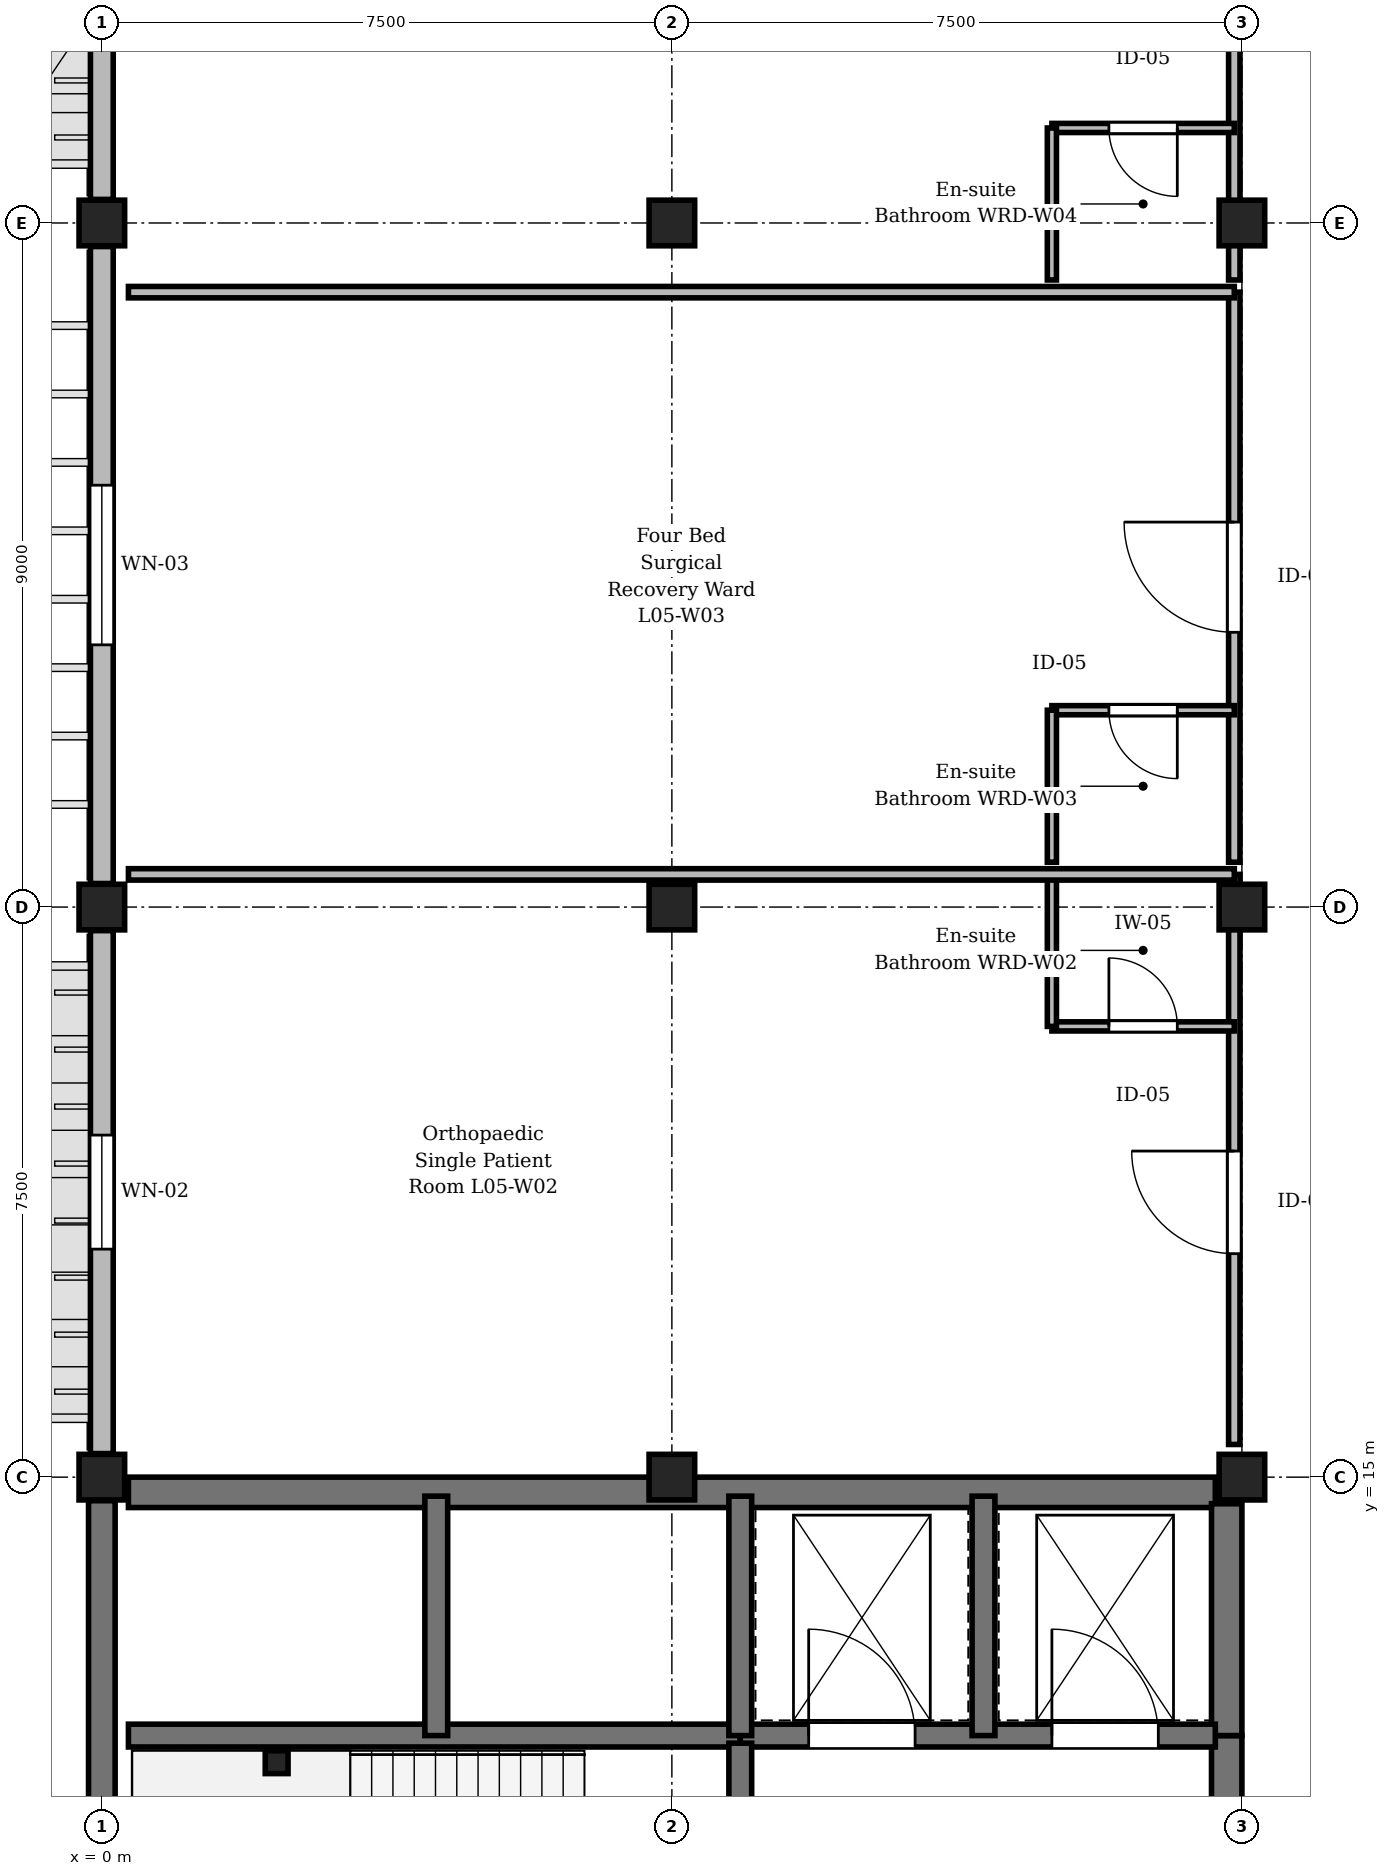
"""IFC4 building model, lengths in metres.
Left out: names, types, materials, properties, quantities, classifications, styles, units other than length and angle.
Written with IfcOpenShell. Run it as: python <this file> out.ifc"""

import sys

from ifc_helpers import new_model, si_unit, direction, frame, frame_2d, origin, origin_2d, place, context, subcontext, project, spatial, rectangle, circle, i_section, extrude, element, fill, save


model = new_model("IFC4")
c1 = context("Model", 3, precision=1e-05, world=origin(), true_north=direction((0.0, 1.0)))
c2 = subcontext(c1, "Body", "Model", "MODEL_VIEW")
j1 = project(units=[si_unit("LENGTHUNIT", "METRE"), si_unit("PLANEANGLEUNIT", "RADIAN")], contexts=[c1])
p1 = place(None, origin())
s1 = spatial("IfcSite", under=j1, at=p1, CompositionType="ELEMENT")
p2 = place(p1, origin())
s2 = spatial("IfcBuilding", under=s1, at=p2, CompositionType="ELEMENT")
p3 = place(p2, frame((0.0, 0.0, 21.9)))
s3 = spatial("IfcBuildingStorey", under=s2, at=p3, CompositionType="ELEMENT", Elevation=21.9)
p4 = place(p3, frame((0.0, 15.0, 0.0), z_axis=(0.0, 0.0, 1.0), x_axis=(1.0, 0.0, 0.0)))
e1 = element("IfcColumn", 1, at=p4, inside=s3, PredefinedType="COLUMN", context=c2, shape_type="SweptSolid", body=[
    extrude(rectangle(XDim=0.6, YDim=0.6, at=origin_2d()), origin(), (0.0, 0.0, 1.0), 4.05),
])
p5 = place(p3, frame((0.0, 22.5, 0.0), z_axis=(0.0, 0.0, 1.0), x_axis=(1.0, 0.0, 0.0)))
e2 = element("IfcColumn", 2, at=p5, inside=s3, PredefinedType="COLUMN", context=c2, shape_type="SweptSolid", body=[
    extrude(circle(Radius=0.3, at=origin_2d()), origin(), (0.0, 0.0, 1.0), 4.05),
])
p6 = place(p3, frame((0.0, 31.5, 0.0), z_axis=(0.0, 0.0, 1.0), x_axis=(1.0, 0.0, 0.0)))
e3 = element("IfcColumn", 3, at=p6, inside=s3, PredefinedType="COLUMN", context=c2, shape_type="SweptSolid", body=[
    extrude(rectangle(XDim=0.6, YDim=0.6, at=origin_2d()), origin(), (0.0, 0.0, 1.0), 4.05),
])
p7 = place(p3, frame((7.5, 15.0, 0.0), z_axis=(0.0, 0.0, 1.0), x_axis=(1.0, 0.0, 0.0)))
e4 = element("IfcColumn", 4, at=p7, inside=s3, PredefinedType="COLUMN", context=c2, shape_type="SweptSolid", body=[
    extrude(circle(Radius=0.3, at=origin_2d()), origin(), (0.0, 0.0, 1.0), 4.05),
])
for number, where, z_axis, x_axis in (
    (5, (7.5, 22.5, 0.0), (0.0, 0.0, 1.0), (1.0, 0.0, 0.0)),
    (6, (7.5, 31.5, 0.0), (0.0, 0.0, 1.0), (1.0, 0.0, 0.0)),
    (7, (15.0, 15.0, 0.0), (0.0, 0.0, 1.0), (1.0, 0.0, 0.0)),
    (8, (15.0, 22.5, 0.0), (0.0, 0.0, 1.0), (1.0, 0.0, 0.0)),
):
    element("IfcColumn", number, at=place(p3, frame(where, z_axis=z_axis, x_axis=x_axis)), inside=s3, PredefinedType="COLUMN", context=c2, shape_type="SweptSolid", body=[
        extrude(rectangle(XDim=0.6, YDim=0.6, at=origin_2d()), origin(), (0.0, 0.0, 1.0), 4.05),
    ])
p8 = place(p3, frame((15.0, 31.5, 0.0), z_axis=(0.0, 0.0, 1.0), x_axis=(1.0, 0.0, 0.0)))
e9 = element("IfcColumn", 9, at=p8, inside=s3, PredefinedType="COLUMN", context=c2, shape_type="SweptSolid", body=[
    extrude(circle(Radius=0.3, at=origin_2d()), origin(), (0.0, 0.0, 1.0), 4.05),
])
p9 = place(p3, frame((2.3, 11.25, 0.0), z_axis=(0.0, 0.0, 1.0), x_axis=(1.0, 0.0, 0.0)))
e10 = element("IfcColumn", 10, at=p9, inside=s3, PredefinedType="COLUMN", context=c2, shape_type="SweptSolid", body=[
    extrude(i_section(OverallWidth=0.3, OverallDepth=0.3, WebThickness=0.011, FlangeThickness=0.019, FilletRadius=0.027, at=origin_2d()), origin(), (0.0, 0.0, 1.0), 4.05),
])
p10 = place(p3, frame((0.0, 7.81, 0.0), z_axis=(0.0, 0.0, 1.0), x_axis=(0.0, 1.0, 0.0)))
e11 = element("IfcWall", 11, at=p10, inside=s3, PredefinedType="SHEAR", context=c2, shape_type="SweptSolid", body=[
    extrude(rectangle(XDim=6.88, YDim=0.35, at=frame_2d((3.44, 0.0))), origin(), (0.0, 0.0, 1.0), 3.77),
])
p11 = place(p3, frame((0.0, 15.31, 0.0), z_axis=(0.0, 0.0, 1.0), x_axis=(0.0, 1.0, 0.0)))
e12 = element("IfcWall", 12, at=p11, inside=s3, PredefinedType="STANDARD", context=c2, shape_type="SweptSolid", body=[
    extrude(rectangle(XDim=6.88, YDim=0.3, at=frame_2d((3.44, 0.0))), origin(), (0.0, 0.0, 1.0), 3.17),
])
p12 = place(p11, frame((2.69, 0.0, 0.9)))
e13 = element("IfcOpeningElement", 13, at=p12, cuts=e12, PredefinedType="OPENING", context=c2, shape_type="SweptSolid", body=[
    extrude(rectangle(XDim=1.5, YDim=1.99, at=frame_2d((0.75, 0.995))), frame((0.0, 0.16, 0.0), z_axis=(0.0, -1.0, 0.0), x_axis=(1.0, 0.0, 0.0)), (0.0, 0.0, 1.0), 0.32),
])
p13 = place(p3, frame((0.0, 22.81, 0.0), z_axis=(0.0, 0.0, 1.0), x_axis=(0.0, 1.0, 0.0)))
e14 = element("IfcWall", 14, at=p13, inside=s3, PredefinedType="STANDARD", context=c2, shape_type="SweptSolid", body=[
    extrude(rectangle(XDim=8.38, YDim=0.3, at=frame_2d((4.19, 0.0))), origin(), (0.0, 0.0, 1.0), 3.22),
])
p14 = place(p13, frame((3.14, 0.0, 0.9)))
e15 = element("IfcOpeningElement", 15, at=p14, cuts=e14, PredefinedType="OPENING", context=c2, shape_type="SweptSolid", body=[
    extrude(rectangle(XDim=2.1, YDim=2.04, at=frame_2d((1.05, 1.02))), frame((0.0, 0.16, 0.0), z_axis=(0.0, -1.0, 0.0), x_axis=(1.0, 0.0, 0.0)), (0.0, 0.0, 1.0), 0.32),
])
p15 = place(p3, frame((0.0, 31.81, 0.0), z_axis=(0.0, 0.0, 1.0), x_axis=(0.0, 1.0, 0.0)))
e16 = element("IfcWall", 16, at=p15, inside=s3, PredefinedType="STANDARD", context=c2, shape_type="SweptSolid", body=[
    extrude(rectangle(XDim=6.88, YDim=0.3, at=frame_2d((3.44, 0.0))), origin(), (0.0, 0.0, 1.0), 3.17),
])
p16 = place(p15, frame((2.24, 0.0, 0.9)))
e17 = element("IfcOpeningElement", 17, at=p16, cuts=e16, PredefinedType="OPENING", context=c2, shape_type="SweptSolid", body=[
    extrude(rectangle(XDim=2.4, YDim=1.99, at=frame_2d((1.2, 0.995))), frame((0.0, 0.16, 0.0), z_axis=(0.0, -1.0, 0.0), x_axis=(1.0, 0.0, 0.0)), (0.0, 0.0, 1.0), 0.32),
])
p17 = place(p3, frame((0.35, 14.8, 0.0), z_axis=(0.0, 0.0, 1.0), x_axis=(1.0, 0.0, 0.0)))
e18 = element("IfcWall", 18, at=p17, inside=s3, PredefinedType="SHEAR", context=c2, shape_type="SweptSolid", body=[
    extrude(rectangle(XDim=14.3, YDim=0.4, at=frame_2d((7.15, 0.0))), origin(), (0.0, 0.0, 1.0), 3.77),
])
p18 = place(p3, frame((14.8, 7.85, 0.0), z_axis=(0.0, 0.0, 1.0), x_axis=(0.0, 1.0, 0.0)))
e19 = element("IfcWall", 19, at=p18, inside=s3, PredefinedType="SHEAR", context=c2, shape_type="SweptSolid", body=[
    extrude(rectangle(XDim=3.75, YDim=0.4, at=frame_2d((1.875, 0.0))), origin(), (0.0, 0.0, 1.0), 3.77),
])
p19 = place(p3, frame((14.8, 11.6, 0.0), z_axis=(0.0, 0.0, 1.0), x_axis=(0.0, 1.0, 0.0)))
e20 = element("IfcWall", 20, at=p19, inside=s3, PredefinedType="SHEAR", context=c2, shape_type="SweptSolid", body=[
    extrude(rectangle(XDim=3.05, YDim=0.4, at=frame_2d((1.525, 0.0))), origin(), (0.0, 0.0, 1.0), 3.77),
])
p20 = place(p3, frame((0.35, 11.6, 0.0), z_axis=(0.0, 0.0, 1.0), x_axis=(1.0, 0.0, 0.0)))
e21 = element("IfcWall", 21, at=p20, inside=s3, PredefinedType="SHEAR", context=c2, shape_type="SweptSolid", body=[
    extrude(rectangle(XDim=8.05, YDim=0.3, at=frame_2d((4.025, 0.0))), origin(), (0.0, 0.0, 1.0), 3.77),
])
p21 = place(p3, frame((8.4, 11.6, 0.0), z_axis=(0.0, 0.0, 1.0), x_axis=(1.0, 0.0, 0.0)))
e22 = element("IfcWall", 22, at=p21, inside=s3, PredefinedType="SHEAR", context=c2, shape_type="SweptSolid", body=[
    extrude(rectangle(XDim=6.25, YDim=0.3, at=frame_2d((3.125, 0.0))), origin(), (0.0, 0.0, 1.0), 3.77),
])
p22 = place(p21, frame((0.9, 0.0, 0.0)))
e23 = element("IfcOpeningElement", 23, at=p22, cuts=e22, PredefinedType="OPENING", context=c2, shape_type="SweptSolid", body=[
    extrude(rectangle(XDim=1.4, YDim=2.25, at=frame_2d((0.7, 1.125))), frame((0.0, 0.16, 0.0), z_axis=(0.0, -1.0, 0.0), x_axis=(1.0, 0.0, 0.0)), (0.0, 0.0, 1.0), 0.32),
])
p23 = place(p21, frame((4.1, 0.0, 0.0)))
e24 = element("IfcOpeningElement", 24, at=p23, cuts=e22, PredefinedType="OPENING", context=c2, shape_type="SweptSolid", body=[
    extrude(rectangle(XDim=1.4, YDim=2.25, at=frame_2d((0.7, 1.125))), frame((0.0, 0.16, 0.0), z_axis=(0.0, -1.0, 0.0), x_axis=(1.0, 0.0, 0.0)), (0.0, 0.0, 1.0), 0.32),
])
p24 = place(p3, frame((8.4, 11.5, 0.0), z_axis=(0.0, 0.0, 1.0), x_axis=(0.0, -1.0, 0.0)))
e25 = element("IfcWall", 25, at=p24, inside=s3, PredefinedType="SHEAR", context=c2, shape_type="SweptSolid", body=[
    extrude(rectangle(XDim=3.65, YDim=0.3, at=frame_2d((1.825, 0.0))), origin(), (0.0, 0.0, 1.0), 3.77),
])
p25 = place(p24, frame((1.22, 0.0, 0.0)))
e26 = element("IfcOpeningElement", 26, at=p25, cuts=e25, PredefinedType="OPENING", context=c2, shape_type="SweptSolid", body=[
    extrude(rectangle(XDim=1.2, YDim=2.25, at=frame_2d((0.6, 1.125))), frame((0.0, 0.16, 0.0), z_axis=(0.0, -1.0, 0.0), x_axis=(1.0, 0.0, 0.0)), (0.0, 0.0, 1.0), 0.32),
])
for number, where, z_axis, x_axis in (
    (27, (4.4, 11.6, 0.0), (0.0, 0.0, 1.0), (0.0, 1.0, 0.0)),
    (28, (8.4, 11.6, 0.0), (0.0, 0.0, 1.0), (0.0, 1.0, 0.0)),
    (29, (11.6, 11.6, 0.0), (0.0, 0.0, 1.0), (0.0, 1.0, 0.0)),
):
    element("IfcWall", number, at=place(p3, frame(where, z_axis=z_axis, x_axis=x_axis)), inside=s3, PredefinedType="SHEAR", context=c2, shape_type="SweptSolid", body=[
        extrude(rectangle(XDim=3.15, YDim=0.3, at=frame_2d((1.575, 0.0))), origin(), (0.0, 0.0, 1.0), 3.77),
    ])
p26 = place(p3, frame((14.9, 15.43, 0.0), z_axis=(0.0, 0.0, 1.0), x_axis=(0.0, 1.0, 0.0)))
e30 = element("IfcWall", 30, at=p26, inside=s3, PredefinedType="PARTITIONING", context=c2, shape_type="SweptSolid", body=[
    extrude(rectangle(XDim=7.5, YDim=0.15, at=frame_2d((3.75, 0.0))), origin(), (0.0, 0.0, 1.0), 3.055),
])
p27 = place(p26, frame((2.51, 0.0, 0.0)))
e31 = element("IfcOpeningElement", 31, at=p27, cuts=e30, PredefinedType="OPENING", context=c2, shape_type="SweptSolid", body=[
    extrude(rectangle(XDim=1.35, YDim=2.25, at=frame_2d((0.675, 1.125))), frame((0.0, 0.085, 0.0), z_axis=(0.0, -1.0, 0.0), x_axis=(1.0, 0.0, 0.0)), (0.0, 0.0, 1.0), 0.17),
])
p28 = place(p3, frame((12.5, 20.93, 0.0), z_axis=(0.0, 0.0, 1.0), x_axis=(1.0, 0.0, 0.0)))
e32 = element("IfcWall", 32, at=p28, inside=s3, PredefinedType="PARTITIONING", context=c2, shape_type="SweptSolid", body=[
    extrude(rectangle(XDim=2.4, YDim=0.12, at=frame_2d((1.2, 0.0))), origin(), (0.0, 0.0, 1.0), 3.755),
])
p29 = place(p28, frame((0.75, 0.0, 0.0)))
e33 = element("IfcOpeningElement", 33, at=p29, cuts=e32, PredefinedType="OPENING", context=c2, shape_type="SweptSolid", body=[
    extrude(rectangle(XDim=0.9, YDim=2.1, at=frame_2d((0.45, 1.05))), frame((0.0, 0.07, 0.0), z_axis=(0.0, -1.0, 0.0), x_axis=(1.0, 0.0, 0.0)), (0.0, 0.0, 1.0), 0.14),
])
p30 = place(p3, frame((12.5, 20.93, 0.0), z_axis=(0.0, 0.0, 1.0), x_axis=(0.0, 1.0, 0.0)))
e34 = element("IfcWall", 34, at=p30, inside=s3, PredefinedType="PARTITIONING", context=c2, shape_type="SweptSolid", body=[
    extrude(rectangle(XDim=2.0, YDim=0.12, at=frame_2d((1.0, 0.0))), origin(), (0.0, 0.0, 1.0), 3.755),
])
p31 = place(p3, frame((14.9, 23.09, 0.0), z_axis=(0.0, 0.0, 1.0), x_axis=(0.0, 1.0, 0.0)))
e35 = element("IfcWall", 35, at=p31, inside=s3, PredefinedType="PARTITIONING", context=c2, shape_type="SweptSolid", body=[
    extrude(rectangle(XDim=7.5, YDim=0.15, at=frame_2d((3.75, 0.0))), origin(), (0.0, 0.0, 1.0), 3.055),
])
p32 = place(p31, frame((3.025, 0.0, 0.0)))
e36 = element("IfcOpeningElement", 36, at=p32, cuts=e35, PredefinedType="OPENING", context=c2, shape_type="SweptSolid", body=[
    extrude(rectangle(XDim=1.45, YDim=2.3, at=frame_2d((0.725, 1.15))), frame((0.0, 0.085, 0.0), z_axis=(0.0, -1.0, 0.0), x_axis=(1.0, 0.0, 0.0)), (0.0, 0.0, 1.0), 0.17),
])
p33 = place(p3, frame((14.9, 25.09, 0.0), z_axis=(0.0, 0.0, 1.0), x_axis=(-1.0, 0.0, 0.0)))
e37 = element("IfcWall", 37, at=p33, inside=s3, PredefinedType="PARTITIONING", context=c2, shape_type="SweptSolid", body=[
    extrude(rectangle(XDim=2.4, YDim=0.12, at=frame_2d((1.2, 0.0))), origin(), (0.0, 0.0, 1.0), 3.755),
])
p34 = place(p33, frame((0.75, 0.0, 0.0)))
e38 = element("IfcOpeningElement", 38, at=p34, cuts=e37, PredefinedType="OPENING", context=c2, shape_type="SweptSolid", body=[
    extrude(rectangle(XDim=0.9, YDim=2.1, at=frame_2d((0.45, 1.05))), frame((0.0, 0.07, 0.0), z_axis=(0.0, -1.0, 0.0), x_axis=(1.0, 0.0, 0.0)), (0.0, 0.0, 1.0), 0.14),
])
p35 = place(p3, frame((12.5, 23.09, 0.0), z_axis=(0.0, 0.0, 1.0), x_axis=(0.0, 1.0, 0.0)))
e39 = element("IfcWall", 39, at=p35, inside=s3, PredefinedType="PARTITIONING", context=c2, shape_type="SweptSolid", body=[
    extrude(rectangle(XDim=2.0, YDim=0.12, at=frame_2d((1.0, 0.0))), origin(), (0.0, 0.0, 1.0), 3.755),
])
p36 = place(p3, frame((14.9, 30.75, 0.0), z_axis=(0.0, 0.0, 1.0), x_axis=(0.0, 1.0, 0.0)))
e40 = element("IfcWall", 40, at=p36, inside=s3, PredefinedType="PARTITIONING", context=c2, shape_type="SweptSolid", body=[
    extrude(rectangle(XDim=7.5, YDim=0.15, at=frame_2d((3.75, 0.0))), origin(), (0.0, 0.0, 1.0), 3.055),
])
p37 = place(p36, frame((3.64, 0.0, 0.0)))
e41 = element("IfcOpeningElement", 41, at=p37, cuts=e40, PredefinedType="OPENING", context=c2, shape_type="SweptSolid", body=[
    extrude(rectangle(XDim=1.35, YDim=2.25, at=frame_2d((0.675, 1.125))), frame((0.0, 0.085, 0.0), z_axis=(0.0, -1.0, 0.0), x_axis=(1.0, 0.0, 0.0)), (0.0, 0.0, 1.0), 0.17),
])
p38 = place(p3, frame((14.9, 32.75, 0.0), z_axis=(0.0, 0.0, 1.0), x_axis=(-1.0, 0.0, 0.0)))
e42 = element("IfcWall", 42, at=p38, inside=s3, PredefinedType="PARTITIONING", context=c2, shape_type="SweptSolid", body=[
    extrude(rectangle(XDim=2.4, YDim=0.12, at=frame_2d((1.2, 0.0))), origin(), (0.0, 0.0, 1.0), 3.755),
])
p39 = place(p38, frame((0.75, 0.0, 0.0)))
e43 = element("IfcOpeningElement", 43, at=p39, cuts=e42, PredefinedType="OPENING", context=c2, shape_type="SweptSolid", body=[
    extrude(rectangle(XDim=0.9, YDim=2.1, at=frame_2d((0.45, 1.05))), frame((0.0, 0.07, 0.0), z_axis=(0.0, -1.0, 0.0), x_axis=(1.0, 0.0, 0.0)), (0.0, 0.0, 1.0), 0.14),
])
p40 = place(p3, frame((12.5, 30.75, 0.0), z_axis=(0.0, 0.0, 1.0), x_axis=(0.0, 1.0, 0.0)))
e44 = element("IfcWall", 44, at=p40, inside=s3, PredefinedType="PARTITIONING", context=c2, shape_type="SweptSolid", body=[
    extrude(rectangle(XDim=2.0, YDim=0.12, at=frame_2d((1.0, 0.0))), origin(), (0.0, 0.0, 1.0), 3.755),
])
for number, where, z_axis, x_axis in (
    (45, (0.35, 22.93, 0.0), (0.0, 0.0, 1.0), (1.0, 0.0, 0.0)),
    (46, (0.35, 30.59, 0.0), (0.0, 0.0, 1.0), (1.0, 0.0, 0.0)),
):
    element("IfcWall", number, at=place(p3, frame(where, z_axis=z_axis, x_axis=x_axis)), inside=s3, PredefinedType="PARTITIONING", context=c2, shape_type="SweptSolid", body=[
        extrude(rectangle(XDim=14.55, YDim=0.15, at=frame_2d((7.275, 0.0))), origin(), (0.0, 0.0, 1.0), 3.755),
    ])
p41 = place(p12, origin())
e47 = element("IfcWindow", 47, at=p41, inside=s3, PartitioningType="SINGLE_PANEL", PredefinedType="WINDOW", context=c2, shape_type="SweptSolid", body=[
    extrude(rectangle(XDim=1.5, YDim=1.99, at=frame_2d((0.75, 0.995))), frame((0.0, 0.03, 0.0), z_axis=(0.0, -1.0, 0.0), x_axis=(1.0, 0.0, 0.0)), (0.0, 0.0, 1.0), 0.06),
])
fill(e13, e47)
p42 = place(p14, origin())
e48 = element("IfcWindow", 48, at=p42, inside=s3, PartitioningType="SINGLE_PANEL", PredefinedType="WINDOW", context=c2, shape_type="SweptSolid", body=[
    extrude(rectangle(XDim=2.1, YDim=2.04, at=frame_2d((1.05, 1.02))), frame((0.0, 0.03, 0.0), z_axis=(0.0, -1.0, 0.0), x_axis=(1.0, 0.0, 0.0)), (0.0, 0.0, 1.0), 0.06),
])
fill(e15, e48)
p43 = place(p22, origin())
e49 = element("IfcDoor", 49, at=p43, inside=s3, OperationType="DOUBLE_DOOR_SLIDING", PredefinedType="DOOR", context=c2, shape_type="SweptSolid", body=[
    extrude(rectangle(XDim=1.4, YDim=2.25, at=frame_2d((0.7, 1.125))), frame((0.0, 0.025, 0.0), z_axis=(0.0, -1.0, 0.0), x_axis=(1.0, 0.0, 0.0)), (0.0, 0.0, 1.0), 0.05),
])
fill(e23, e49)
p44 = place(p23, origin())
e50 = element("IfcDoor", 50, at=p44, inside=s3, OperationType="DOUBLE_DOOR_SLIDING", PredefinedType="DOOR", context=c2, shape_type="SweptSolid", body=[
    extrude(rectangle(XDim=1.4, YDim=2.25, at=frame_2d((0.7, 1.125))), frame((0.0, 0.025, 0.0), z_axis=(0.0, -1.0, 0.0), x_axis=(1.0, 0.0, 0.0)), (0.0, 0.0, 1.0), 0.05),
])
fill(e24, e50)
p45 = place(p27, origin())
e51 = element("IfcDoor", 51, at=p45, inside=s3, OperationType="SINGLE_SWING_RIGHT", PredefinedType="DOOR", context=c2, shape_type="SweptSolid", body=[
    extrude(rectangle(XDim=1.35, YDim=2.25, at=frame_2d((0.675, 1.125))), frame((0.0, 0.025, 0.0), z_axis=(0.0, -1.0, 0.0), x_axis=(1.0, 0.0, 0.0)), (0.0, 0.0, 1.0), 0.05),
])
fill(e31, e51)
p46 = place(p29, origin())
e52 = element("IfcDoor", 52, at=p46, inside=s3, OperationType="SINGLE_SWING_LEFT", PredefinedType="DOOR", context=c2, shape_type="SweptSolid", body=[
    extrude(rectangle(XDim=0.9, YDim=2.1, at=frame_2d((0.45, 1.05))), frame((0.0, 0.025, 0.0), z_axis=(0.0, -1.0, 0.0), x_axis=(1.0, 0.0, 0.0)), (0.0, 0.0, 1.0), 0.05),
])
fill(e33, e52)
p47 = place(p32, origin())
e53 = element("IfcDoor", 53, at=p47, inside=s3, OperationType="SINGLE_SWING_RIGHT", PredefinedType="DOOR", context=c2, shape_type="SweptSolid", body=[
    extrude(rectangle(XDim=1.45, YDim=2.3, at=frame_2d((0.725, 1.15))), frame((0.0, 0.025, 0.0), z_axis=(0.0, -1.0, 0.0), x_axis=(1.0, 0.0, 0.0)), (0.0, 0.0, 1.0), 0.05),
])
fill(e36, e53)
p48 = place(p34, origin())
e54 = element("IfcDoor", 54, at=p48, inside=s3, OperationType="SINGLE_SWING_LEFT", PredefinedType="DOOR", context=c2, shape_type="SweptSolid", body=[
    extrude(rectangle(XDim=0.9, YDim=2.1, at=frame_2d((0.45, 1.05))), frame((0.0, 0.025, 0.0), z_axis=(0.0, -1.0, 0.0), x_axis=(1.0, 0.0, 0.0)), (0.0, 0.0, 1.0), 0.05),
])
fill(e38, e54)
p49 = place(p39, origin())
e55 = element("IfcDoor", 55, at=p49, inside=s3, OperationType="SINGLE_SWING_LEFT", PredefinedType="DOOR", context=c2, shape_type="SweptSolid", body=[
    extrude(rectangle(XDim=0.9, YDim=2.1, at=frame_2d((0.45, 1.05))), frame((0.0, 0.025, 0.0), z_axis=(0.0, -1.0, 0.0), x_axis=(1.0, 0.0, 0.0)), (0.0, 0.0, 1.0), 0.05),
])
fill(e43, e55)
save(model, sys.argv[1])
